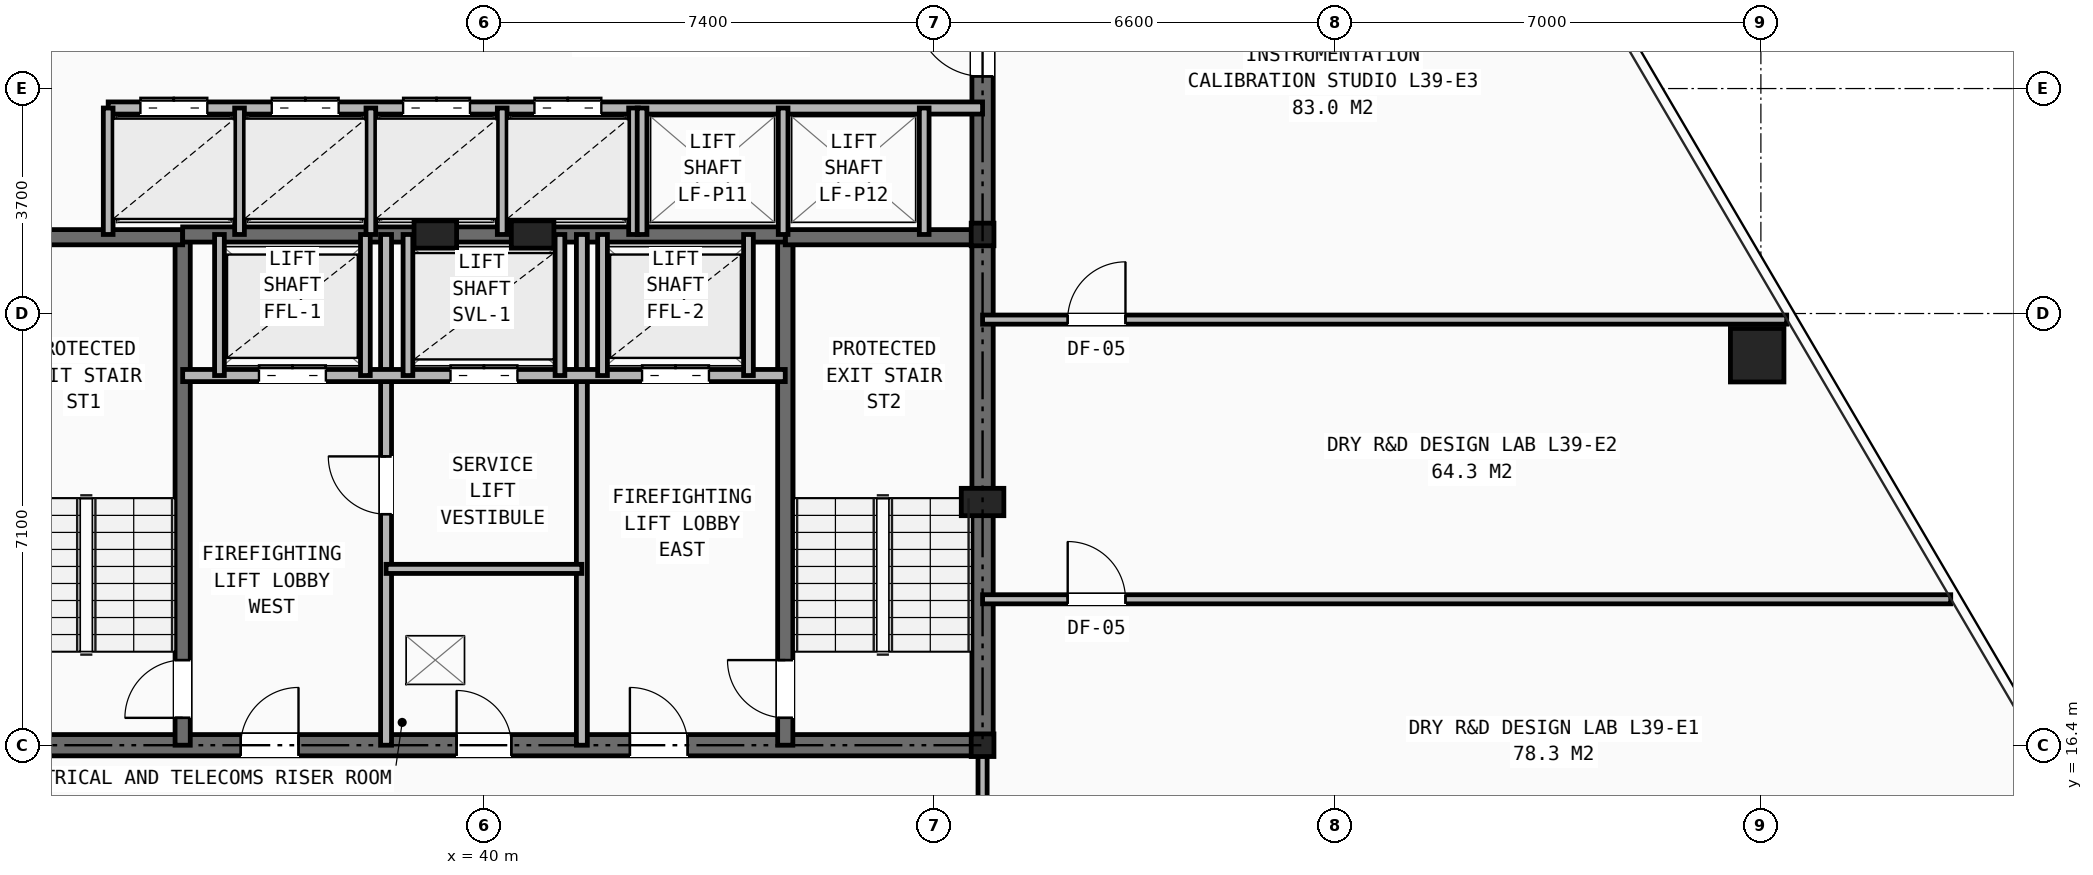
"""IFC4 building model, lengths in metres.
Left out: names, types, materials, properties, quantities, classifications, styles, units other than length and angle.
Written with IfcOpenShell. Run it as: python <this file> out.ifc"""

import sys

from ifc_helpers import new_model, si_unit, direction, frame, frame_2d, origin, origin_2d, place, context, subcontext, project, spatial, rectangle, hollow_rectangle, i_section, extrude, element, fill, save


model = new_model("IFC4")
c1 = context("Model", 3, precision=1e-05, world=origin(), true_north=direction((0.0, 1.0)))
c2 = subcontext(c1, "Body", "Model", "MODEL_VIEW")
j1 = project(units=[si_unit("LENGTHUNIT", "METRE"), si_unit("PLANEANGLEUNIT", "RADIAN")], contexts=[c1])
p1 = place(None, origin())
s1 = spatial("IfcSite", under=j1, at=p1, CompositionType="ELEMENT")
p2 = place(p1, origin())
s2 = spatial("IfcBuilding", under=s1, at=p2, CompositionType="ELEMENT")
p3 = place(p2, frame((0.0, 0.0, 136.7)))
s3 = spatial("IfcBuildingStorey", under=s2, at=p3, CompositionType="ELEMENT", Elevation=136.7)
for number, where, z_axis, x_axis in (
    (1, (48.2, 16.4, 0.0), (0.0, 0.0, 1.0), (1.0, 0.0, 0.0)),
    (2, (48.2, 24.8, 0.0), (0.0, 0.0, 1.0), (1.0, 0.0, 0.0)),
):
    element("IfcColumn", number, at=place(p3, frame(where, z_axis=z_axis, x_axis=x_axis)), inside=s3, PredefinedType="COLUMN", context=c2, shape_type="SweptSolid", body=[
        extrude(i_section(OverallWidth=0.374, OverallDepth=0.372, WebThickness=0.016, FlangeThickness=0.026, at=origin_2d()), origin(), (0.0, 0.0, 1.0), 3.45),
    ])
for number, where, z_axis, x_axis in (
    (3, (48.2, 20.4, 0.0), (0.0, 0.0, 1.0), (1.0, 0.0, 0.0)),
    (4, (39.2, 24.8, 0.0), (0.0, 0.0, 1.0), (1.0, 0.0, 0.0)),
    (5, (40.8, 24.8, 0.0), (0.0, 0.0, 1.0), (1.0, 0.0, 0.0)),
):
    element("IfcColumn", number, at=place(p3, frame(where, z_axis=z_axis, x_axis=x_axis)), inside=s3, PredefinedType="PILASTER", context=c2, shape_type="SweptSolid", body=[
        extrude(rectangle(XDim=0.7, YDim=0.45, at=origin_2d()), origin(), (0.0, 0.0, 1.0), 3.45),
    ])
p4 = place(p3, frame((60.939, 22.814, 0.0), z_axis=(0.0, 0.0, 1.0), x_axis=(1.0, 0.0, 0.0)))
e6 = element("IfcColumn", 6, at=p4, inside=s3, PredefinedType="COLUMN", context=c2, shape_type="SweptSolid", body=[
    extrude(hollow_rectangle(XDim=0.88, YDim=0.88, WallThickness=0.06, at=origin_2d()), origin(), (0.0, 0.0, 1.0), 3.45),
])
p5 = place(p3, frame((31.8, 16.4, 0.0), z_axis=(0.0, 0.0, 1.0), x_axis=(1.0, 0.0, 0.0)))
e7 = element("IfcWall", 7, at=p5, inside=s3, PredefinedType="SHEAR", context=c2, shape_type="SweptSolid", body=[
    extrude(rectangle(XDim=16.4, YDim=0.35, at=frame_2d((8.2, 0.0))), origin(), (0.0, 0.0, 1.0), 3.21),
])
p6 = place(p5, frame((7.75, 0.0, 0.0)))
e8 = element("IfcOpeningElement", 8, at=p6, cuts=e7, PredefinedType="OPENING", context=c2, shape_type="SweptSolid", body=[
    extrude(rectangle(XDim=0.9, YDim=2.1, at=frame_2d((0.45, 1.05))), frame((0.0, 0.185, 0.0), z_axis=(0.0, -1.0, 0.0), x_axis=(1.0, 0.0, 0.0)), (0.0, 0.0, 1.0), 0.37),
])
p7 = place(p5, frame((4.2, 0.0, 0.0)))
e9 = element("IfcOpeningElement", 9, at=p7, cuts=e7, PredefinedType="OPENING", context=c2, shape_type="SweptSolid", body=[
    extrude(rectangle(XDim=0.95, YDim=2.1, at=frame_2d((0.475, 1.05))), frame((0.0, 0.185, 0.0), z_axis=(0.0, -1.0, 0.0), x_axis=(1.0, 0.0, 0.0)), (0.0, 0.0, 1.0), 0.37),
])
p8 = place(p5, frame((10.6, 0.0, 0.0)))
e10 = element("IfcOpeningElement", 10, at=p8, cuts=e7, PredefinedType="OPENING", context=c2, shape_type="SweptSolid", body=[
    extrude(rectangle(XDim=0.95, YDim=2.1, at=frame_2d((0.475, 1.05))), frame((0.0, 0.185, 0.0), z_axis=(0.0, -1.0, 0.0), x_axis=(1.0, 0.0, 0.0)), (0.0, 0.0, 1.0), 0.37),
])
p9 = place(p3, frame((48.2, 16.4, 0.0), z_axis=(0.0, 0.0, 1.0), x_axis=(0.0, 1.0, 0.0)))
e11 = element("IfcWall", 11, at=p9, inside=s3, PredefinedType="SHEAR", context=c2, shape_type="SweptSolid", body=[
    extrude(rectangle(XDim=14.8, YDim=0.35, at=frame_2d((7.4, 0.0))), origin(), (0.0, 0.0, 1.0), 3.21),
])
p10 = place(p9, frame((11.0, 0.0, 0.0)))
e12 = element("IfcOpeningElement", 12, at=p10, cuts=e11, PredefinedType="OPENING", context=c2, shape_type="SweptSolid", body=[
    extrude(rectangle(XDim=1.1, YDim=2.15, at=frame_2d((0.55, 1.075))), frame((0.0, 0.185, 0.0), z_axis=(0.0, -1.0, 0.0), x_axis=(1.0, 0.0, 0.0)), (0.0, 0.0, 1.0), 0.37),
])
p11 = place(p3, frame((35.045, 16.4, 0.0), z_axis=(0.0, 0.0, 1.0), x_axis=(0.0, 1.0, 0.0)))
e13 = element("IfcWall", 13, at=p11, inside=s3, PredefinedType="SHEAR", context=c2, shape_type="SweptSolid", body=[
    extrude(rectangle(XDim=8.4, YDim=0.25, at=frame_2d((4.2, 0.0))), origin(), (0.0, 0.0, 1.0), 3.21),
])
p12 = place(p11, frame((0.45, 0.0, 0.0)))
e14 = element("IfcOpeningElement", 14, at=p12, cuts=e13, PredefinedType="OPENING", context=c2, shape_type="SweptSolid", body=[
    extrude(rectangle(XDim=0.95, YDim=2.1, at=frame_2d((0.475, 1.05))), frame((0.0, 0.135, 0.0), z_axis=(0.0, -1.0, 0.0), x_axis=(1.0, 0.0, 0.0)), (0.0, 0.0, 1.0), 0.27),
])
p13 = place(p3, frame((31.8, 24.755, 0.0), z_axis=(0.0, 0.0, 1.0), x_axis=(1.0, 0.0, 0.0)))
e15 = element("IfcWall", 15, at=p13, inside=s3, PredefinedType="SHEAR", context=c2, shape_type="SweptSolid", body=[
    extrude(rectangle(XDim=3.245, YDim=0.25, at=frame_2d((1.623, 0.0))), origin(), (0.0, 0.0, 1.0), 3.21),
])
p14 = place(p3, frame((44.955, 16.4, 0.0), z_axis=(0.0, 0.0, 1.0), x_axis=(0.0, 1.0, 0.0)))
e16 = element("IfcWall", 16, at=p14, inside=s3, PredefinedType="SHEAR", context=c2, shape_type="SweptSolid", body=[
    extrude(rectangle(XDim=8.4, YDim=0.25, at=frame_2d((4.2, 0.0))), origin(), (0.0, 0.0, 1.0), 3.21),
])
p15 = place(p14, frame((0.45, 0.0, 0.0)))
e17 = element("IfcOpeningElement", 17, at=p15, cuts=e16, PredefinedType="OPENING", context=c2, shape_type="SweptSolid", body=[
    extrude(rectangle(XDim=0.95, YDim=2.1, at=frame_2d((0.475, 1.05))), frame((0.0, 0.135, 0.0), z_axis=(0.0, -1.0, 0.0), x_axis=(1.0, 0.0, 0.0)), (0.0, 0.0, 1.0), 0.27),
])
p16 = place(p3, frame((44.955, 24.755, 0.0), z_axis=(0.0, 0.0, 1.0), x_axis=(1.0, 0.0, 0.0)))
e18 = element("IfcWall", 18, at=p16, inside=s3, PredefinedType="SHEAR", context=c2, shape_type="SweptSolid", body=[
    extrude(rectangle(XDim=3.245, YDim=0.25, at=frame_2d((1.623, 0.0))), origin(), (0.0, 0.0, 1.0), 3.21),
])
p17 = place(p3, frame((35.045, 24.8, 0.0), z_axis=(0.0, 0.0, 1.0), x_axis=(1.0, 0.0, 0.0)))
e19 = element("IfcWall", 19, at=p17, inside=s3, PredefinedType="SHEAR", context=c2, shape_type="SweptSolid", body=[
    extrude(rectangle(XDim=9.91, YDim=0.25, at=frame_2d((4.955, 0.0))), origin(), (0.0, 0.0, 1.0), 3.21),
])
p18 = place(p3, frame((38.39, 16.4, 0.0), z_axis=(0.0, 0.0, 1.0), x_axis=(0.0, 1.0, 0.0)))
e20 = element("IfcWall", 20, at=p18, inside=s3, PredefinedType="PARTITIONING", context=c2, shape_type="SweptSolid", body=[
    extrude(rectangle(XDim=8.4, YDim=0.18, at=frame_2d((4.2, 0.0))), origin(), (0.0, 0.0, 1.0), 2.661),
])
p19 = place(p18, frame((3.8, 0.0, 0.0)))
e21 = element("IfcOpeningElement", 21, at=p19, cuts=e20, PredefinedType="OPENING", context=c2, shape_type="SweptSolid", body=[
    extrude(rectangle(XDim=0.95, YDim=2.1, at=frame_2d((0.475, 1.05))), frame((0.0, 0.1, 0.0), z_axis=(0.0, -1.0, 0.0), x_axis=(1.0, 0.0, 0.0)), (0.0, 0.0, 1.0), 0.2),
])
p20 = place(p3, frame((41.61, 16.4, 0.0), z_axis=(0.0, 0.0, 1.0), x_axis=(0.0, 1.0, 0.0)))
e22 = element("IfcWall", 22, at=p20, inside=s3, PredefinedType="PARTITIONING", context=c2, shape_type="SweptSolid", body=[
    extrude(rectangle(XDim=8.4, YDim=0.18, at=frame_2d((4.2, 0.0))), origin(), (0.0, 0.0, 1.0), 2.661),
])
p21 = place(p3, frame((35.045, 22.48, 0.0), z_axis=(0.0, 0.0, 1.0), x_axis=(1.0, 0.0, 0.0)))
e23 = element("IfcWall", 23, at=p21, inside=s3, PredefinedType="SOLIDWALL", context=c2, shape_type="SweptSolid", body=[
    extrude(rectangle(XDim=9.91, YDim=0.2, at=frame_2d((4.955, 0.0))), origin(), (0.0, 0.0, 1.0), 3.21),
])
p22 = place(p21, frame((1.255, 0.0, 0.0)))
e24 = element("IfcOpeningElement", 24, at=p22, cuts=e23, PredefinedType="OPENING", context=c2, shape_type="SweptSolid", body=[
    extrude(rectangle(XDim=1.1, YDim=2.15, at=frame_2d((0.55, 1.075))), frame((0.0, 0.11, 0.0), z_axis=(0.0, -1.0, 0.0), x_axis=(1.0, 0.0, 0.0)), (0.0, 0.0, 1.0), 0.22),
])
p23 = place(p21, frame((7.555, 0.0, 0.0)))
e25 = element("IfcOpeningElement", 25, at=p23, cuts=e23, PredefinedType="OPENING", context=c2, shape_type="SweptSolid", body=[
    extrude(rectangle(XDim=1.1, YDim=2.15, at=frame_2d((0.55, 1.075))), frame((0.0, 0.11, 0.0), z_axis=(0.0, -1.0, 0.0), x_axis=(1.0, 0.0, 0.0)), (0.0, 0.0, 1.0), 0.22),
])
p24 = place(p21, frame((4.405, 0.0, 0.0)))
e26 = element("IfcOpeningElement", 26, at=p24, cuts=e23, PredefinedType="OPENING", context=c2, shape_type="SweptSolid", body=[
    extrude(rectangle(XDim=1.1, YDim=2.15, at=frame_2d((0.55, 1.075))), frame((0.0, 0.11, 0.0), z_axis=(0.0, -1.0, 0.0), x_axis=(1.0, 0.0, 0.0)), (0.0, 0.0, 1.0), 0.22),
])
p25 = place(p3, frame((38.39, 19.3, 0.0), z_axis=(0.0, 0.0, 1.0), x_axis=(1.0, 0.0, 0.0)))
e27 = element("IfcWall", 27, at=p25, inside=s3, PredefinedType="PARTITIONING", context=c2, shape_type="SweptSolid", body=[
    extrude(rectangle(XDim=3.22, YDim=0.15, at=frame_2d((1.61, 0.0))), origin(), (0.0, 0.0, 1.0), 3.21),
])
for number, where, z_axis, x_axis in (
    (28, (35.65, 22.48, 0.0), (0.0, 0.0, 1.0), (0.0, 1.0, 0.0)),
    (29, (38.05, 22.48, 0.0), (0.0, 0.0, 1.0), (0.0, 1.0, 0.0)),
    (30, (41.95, 22.48, 0.0), (0.0, 0.0, 1.0), (0.0, 1.0, 0.0)),
    (31, (44.35, 22.48, 0.0), (0.0, 0.0, 1.0), (0.0, 1.0, 0.0)),
    (32, (38.75, 22.48, 0.0), (0.0, 0.0, 1.0), (0.0, 1.0, 0.0)),
    (33, (41.25, 22.48, 0.0), (0.0, 0.0, 1.0), (0.0, 1.0, 0.0)),
):
    element("IfcWall", number, at=place(p3, frame(where, z_axis=z_axis, x_axis=x_axis)), inside=s3, PredefinedType="SOLIDWALL", context=c2, shape_type="SweptSolid", body=[
        extrude(rectangle(XDim=2.32, YDim=0.16, at=frame_2d((1.16, 0.0))), origin(), (0.0, 0.0, 1.0), 3.21),
    ])
p26 = place(p3, frame((33.82, 26.88, 0.0), z_axis=(0.0, 0.0, 1.0), x_axis=(1.0, 0.0, 0.0)))
e34 = element("IfcWall", 34, at=p26, inside=s3, PredefinedType="SOLIDWALL", context=c2, shape_type="SweptSolid", body=[
    extrude(rectangle(XDim=14.38, YDim=0.2, at=frame_2d((7.19, 0.0))), origin(), (0.0, 0.0, 1.0), 2.661),
])
p27 = place(p26, frame((0.53, 0.0, 0.0)))
e35 = element("IfcOpeningElement", 35, at=p27, cuts=e34, PredefinedType="OPENING", context=c2, shape_type="SweptSolid", body=[
    extrude(rectangle(XDim=1.1, YDim=2.15, at=frame_2d((0.55, 1.075))), frame((0.0, 0.11, 0.0), z_axis=(0.0, -1.0, 0.0), x_axis=(1.0, 0.0, 0.0)), (0.0, 0.0, 1.0), 0.22),
])
p28 = place(p26, frame((2.69, 0.0, 0.0)))
e36 = element("IfcOpeningElement", 36, at=p28, cuts=e34, PredefinedType="OPENING", context=c2, shape_type="SweptSolid", body=[
    extrude(rectangle(XDim=1.1, YDim=2.15, at=frame_2d((0.55, 1.075))), frame((0.0, 0.11, 0.0), z_axis=(0.0, -1.0, 0.0), x_axis=(1.0, 0.0, 0.0)), (0.0, 0.0, 1.0), 0.22),
])
p29 = place(p26, frame((4.85, 0.0, 0.0)))
e37 = element("IfcOpeningElement", 37, at=p29, cuts=e34, PredefinedType="OPENING", context=c2, shape_type="SweptSolid", body=[
    extrude(rectangle(XDim=1.1, YDim=2.15, at=frame_2d((0.55, 1.075))), frame((0.0, 0.11, 0.0), z_axis=(0.0, -1.0, 0.0), x_axis=(1.0, 0.0, 0.0)), (0.0, 0.0, 1.0), 0.22),
])
p30 = place(p26, frame((7.01, 0.0, 0.0)))
e38 = element("IfcOpeningElement", 38, at=p30, cuts=e34, PredefinedType="OPENING", context=c2, shape_type="SweptSolid", body=[
    extrude(rectangle(XDim=1.1, YDim=2.15, at=frame_2d((0.55, 1.075))), frame((0.0, 0.11, 0.0), z_axis=(0.0, -1.0, 0.0), x_axis=(1.0, 0.0, 0.0)), (0.0, 0.0, 1.0), 0.22),
])
for number, where, z_axis, x_axis in (
    (39, (33.82, 24.8, 0.0), (0.0, 0.0, 1.0), (0.0, 1.0, 0.0)),
    (40, (35.98, 24.8, 0.0), (0.0, 0.0, 1.0), (0.0, 1.0, 0.0)),
    (41, (38.14, 24.8, 0.0), (0.0, 0.0, 1.0), (0.0, 1.0, 0.0)),
    (42, (40.3, 24.8, 0.0), (0.0, 0.0, 1.0), (0.0, 1.0, 0.0)),
    (43, (42.46, 24.8, 0.0), (0.0, 0.0, 1.0), (0.0, 1.0, 0.0)),
    (44, (42.6, 24.8, 0.0), (0.0, 0.0, 1.0), (0.0, 1.0, 0.0)),
    (45, (44.92, 24.8, 0.0), (0.0, 0.0, 1.0), (0.0, 1.0, 0.0)),
    (46, (47.24, 24.8, 0.0), (0.0, 0.0, 1.0), (0.0, 1.0, 0.0)),
):
    element("IfcWall", number, at=place(p3, frame(where, z_axis=z_axis, x_axis=x_axis)), inside=s3, PredefinedType="SOLIDWALL", context=c2, shape_type="SweptSolid", body=[
        extrude(rectangle(XDim=2.08, YDim=0.16, at=frame_2d((1.04, 0.0))), origin(), (0.0, 0.0, 1.0), 3.21),
    ])
p31 = place(p3, frame((48.2, 14.1, 0.0), z_axis=(0.0, 0.0, 1.0), x_axis=(0.0, 1.0, 0.0)))
e47 = element("IfcWall", 47, at=p31, inside=s3, PredefinedType="PARTITIONING", context=c2, shape_type="SweptSolid", body=[
    extrude(rectangle(XDim=2.3, YDim=0.15, at=frame_2d((1.15, 0.0))), origin(), (0.0, 0.0, 1.0), 2.661),
])
p32 = place(p3, frame((48.2, 18.8, 0.0), z_axis=(0.0, 0.0, 1.0), x_axis=(1.0, 0.0, 0.0)))
e48 = element("IfcWall", 48, at=p32, inside=s3, PredefinedType="PARTITIONING", context=c2, shape_type="SweptSolid", body=[
    extrude(rectangle(XDim=15.922, YDim=0.15, at=frame_2d((7.961, 0.0))), origin(), (0.0, 0.0, 1.0), 2.589),
])
p33 = place(p32, frame((1.4, 0.0, 0.0)))
e49 = element("IfcOpeningElement", 49, at=p33, cuts=e48, PredefinedType="OPENING", context=c2, shape_type="SweptSolid", body=[
    extrude(rectangle(XDim=0.95, YDim=2.1, at=frame_2d((0.475, 1.05))), frame((0.0, 0.085, 0.0), z_axis=(0.0, -1.0, 0.0), x_axis=(1.0, 0.0, 0.0)), (0.0, 0.0, 1.0), 0.17),
])
p34 = place(p3, frame((48.2, 23.4, 0.0), z_axis=(0.0, 0.0, 1.0), x_axis=(1.0, 0.0, 0.0)))
e50 = element("IfcWall", 50, at=p34, inside=s3, PredefinedType="PARTITIONING", context=c2, shape_type="SweptSolid", body=[
    extrude(rectangle(XDim=13.225, YDim=0.15, at=frame_2d((6.612, 0.0))), origin(), (0.0, 0.0, 1.0), 2.589),
])
p35 = place(p34, frame((1.4, 0.0, 0.0)))
e51 = element("IfcOpeningElement", 51, at=p35, cuts=e50, PredefinedType="OPENING", context=c2, shape_type="SweptSolid", body=[
    extrude(rectangle(XDim=0.95, YDim=2.1, at=frame_2d((0.475, 1.05))), frame((0.0, 0.085, 0.0), z_axis=(0.0, -1.0, 0.0), x_axis=(1.0, 0.0, 0.0)), (0.0, 0.0, 1.0), 0.17),
])
p36 = place(p6, origin())
e52 = element("IfcDoor", 52, at=p36, inside=s3, OperationType="SINGLE_SWING_LEFT", PredefinedType="DOOR", context=c2, shape_type="SweptSolid", body=[
    extrude(rectangle(XDim=0.9, YDim=2.1, at=frame_2d((0.45, 1.05))), frame((0.0, 0.025, 0.0), z_axis=(0.0, -1.0, 0.0), x_axis=(1.0, 0.0, 0.0)), (0.0, 0.0, 1.0), 0.05),
])
fill(e8, e52)
p37 = place(p19, origin())
e53 = element("IfcDoor", 53, at=p37, inside=s3, OperationType="SINGLE_SWING_RIGHT", PredefinedType="DOOR", context=c2, shape_type="SweptSolid", body=[
    extrude(rectangle(XDim=0.95, YDim=2.1, at=frame_2d((0.475, 1.05))), frame((0.0, 0.025, 0.0), z_axis=(0.0, -1.0, 0.0), x_axis=(1.0, 0.0, 0.0)), (0.0, 0.0, 1.0), 0.05),
])
fill(e21, e53)
p38 = place(p12, origin())
e54 = element("IfcDoor", 54, at=p38, inside=s3, OperationType="SINGLE_SWING_LEFT", PredefinedType="DOOR", context=c2, shape_type="SweptSolid", body=[
    extrude(rectangle(XDim=0.95, YDim=2.1, at=frame_2d((0.475, 1.05))), frame((0.0, 0.025, 0.0), z_axis=(0.0, -1.0, 0.0), x_axis=(1.0, 0.0, 0.0)), (0.0, 0.0, 1.0), 0.05),
])
fill(e14, e54)
p39 = place(p15, origin())
e55 = element("IfcDoor", 55, at=p39, inside=s3, OperationType="SINGLE_SWING_RIGHT", PredefinedType="DOOR", context=c2, shape_type="SweptSolid", body=[
    extrude(rectangle(XDim=0.95, YDim=2.1, at=frame_2d((0.475, 1.05))), frame((0.0, 0.025, 0.0), z_axis=(0.0, -1.0, 0.0), x_axis=(1.0, 0.0, 0.0)), (0.0, 0.0, 1.0), 0.05),
])
fill(e17, e55)
p40 = place(p7, origin())
e56 = element("IfcDoor", 56, at=p40, inside=s3, OperationType="SINGLE_SWING_RIGHT", PredefinedType="DOOR", context=c2, shape_type="SweptSolid", body=[
    extrude(rectangle(XDim=0.95, YDim=2.1, at=frame_2d((0.475, 1.05))), frame((0.0, 0.025, 0.0), z_axis=(0.0, -1.0, 0.0), x_axis=(1.0, 0.0, 0.0)), (0.0, 0.0, 1.0), 0.05),
])
fill(e9, e56)
p41 = place(p8, origin())
e57 = element("IfcDoor", 57, at=p41, inside=s3, OperationType="SINGLE_SWING_LEFT", PredefinedType="DOOR", context=c2, shape_type="SweptSolid", body=[
    extrude(rectangle(XDim=0.95, YDim=2.1, at=frame_2d((0.475, 1.05))), frame((0.0, 0.025, 0.0), z_axis=(0.0, -1.0, 0.0), x_axis=(1.0, 0.0, 0.0)), (0.0, 0.0, 1.0), 0.05),
])
fill(e10, e57)
p42 = place(p22, origin())
e58 = element("IfcDoor", 58, at=p42, inside=s3, OperationType="DOUBLE_DOOR_SLIDING", PredefinedType="DOOR", context=c2, shape_type="SweptSolid", body=[
    extrude(rectangle(XDim=1.1, YDim=2.15, at=frame_2d((0.55, 1.075))), frame((0.0, 0.025, 0.0), z_axis=(0.0, -1.0, 0.0), x_axis=(1.0, 0.0, 0.0)), (0.0, 0.0, 1.0), 0.05),
])
fill(e24, e58)
p43 = place(p23, origin())
e59 = element("IfcDoor", 59, at=p43, inside=s3, OperationType="DOUBLE_DOOR_SLIDING", PredefinedType="DOOR", context=c2, shape_type="SweptSolid", body=[
    extrude(rectangle(XDim=1.1, YDim=2.15, at=frame_2d((0.55, 1.075))), frame((0.0, 0.025, 0.0), z_axis=(0.0, -1.0, 0.0), x_axis=(1.0, 0.0, 0.0)), (0.0, 0.0, 1.0), 0.05),
])
fill(e25, e59)
p44 = place(p24, origin())
e60 = element("IfcDoor", 60, at=p44, inside=s3, OperationType="DOUBLE_DOOR_SLIDING", PredefinedType="DOOR", context=c2, shape_type="SweptSolid", body=[
    extrude(rectangle(XDim=1.1, YDim=2.15, at=frame_2d((0.55, 1.075))), frame((0.0, 0.025, 0.0), z_axis=(0.0, -1.0, 0.0), x_axis=(1.0, 0.0, 0.0)), (0.0, 0.0, 1.0), 0.05),
])
fill(e26, e60)
p45 = place(p10, origin())
e61 = element("IfcDoor", 61, at=p45, inside=s3, OperationType="SINGLE_SWING_RIGHT", PredefinedType="DOOR", context=c2, shape_type="SweptSolid", body=[
    extrude(rectangle(XDim=1.1, YDim=2.15, at=frame_2d((0.55, 1.075))), frame((0.0, 0.025, 0.0), z_axis=(0.0, -1.0, 0.0), x_axis=(1.0, 0.0, 0.0)), (0.0, 0.0, 1.0), 0.05),
])
fill(e12, e61)
p46 = place(p27, origin())
e62 = element("IfcDoor", 62, at=p46, inside=s3, OperationType="DOUBLE_DOOR_SLIDING", PredefinedType="DOOR", context=c2, shape_type="SweptSolid", body=[
    extrude(rectangle(XDim=1.1, YDim=2.15, at=frame_2d((0.55, 1.075))), frame((0.0, 0.025, 0.0), z_axis=(0.0, -1.0, 0.0), x_axis=(1.0, 0.0, 0.0)), (0.0, 0.0, 1.0), 0.05),
])
fill(e35, e62)
p47 = place(p28, origin())
e63 = element("IfcDoor", 63, at=p47, inside=s3, OperationType="DOUBLE_DOOR_SLIDING", PredefinedType="DOOR", context=c2, shape_type="SweptSolid", body=[
    extrude(rectangle(XDim=1.1, YDim=2.15, at=frame_2d((0.55, 1.075))), frame((0.0, 0.025, 0.0), z_axis=(0.0, -1.0, 0.0), x_axis=(1.0, 0.0, 0.0)), (0.0, 0.0, 1.0), 0.05),
])
fill(e36, e63)
p48 = place(p29, origin())
e64 = element("IfcDoor", 64, at=p48, inside=s3, OperationType="DOUBLE_DOOR_SLIDING", PredefinedType="DOOR", context=c2, shape_type="SweptSolid", body=[
    extrude(rectangle(XDim=1.1, YDim=2.15, at=frame_2d((0.55, 1.075))), frame((0.0, 0.025, 0.0), z_axis=(0.0, -1.0, 0.0), x_axis=(1.0, 0.0, 0.0)), (0.0, 0.0, 1.0), 0.05),
])
fill(e37, e64)
p49 = place(p30, origin())
e65 = element("IfcDoor", 65, at=p49, inside=s3, OperationType="DOUBLE_DOOR_SLIDING", PredefinedType="DOOR", context=c2, shape_type="SweptSolid", body=[
    extrude(rectangle(XDim=1.1, YDim=2.15, at=frame_2d((0.55, 1.075))), frame((0.0, 0.025, 0.0), z_axis=(0.0, -1.0, 0.0), x_axis=(1.0, 0.0, 0.0)), (0.0, 0.0, 1.0), 0.05),
])
fill(e38, e65)
p50 = place(p33, origin())
e66 = element("IfcDoor", 66, at=p50, inside=s3, OperationType="SINGLE_SWING_LEFT", PredefinedType="DOOR", context=c2, shape_type="SweptSolid", body=[
    extrude(rectangle(XDim=0.95, YDim=2.1, at=frame_2d((0.475, 1.05))), frame((0.0, 0.025, 0.0), z_axis=(0.0, -1.0, 0.0), x_axis=(1.0, 0.0, 0.0)), (0.0, 0.0, 1.0), 0.05),
])
fill(e49, e66)
p51 = place(p35, origin())
e67 = element("IfcDoor", 67, at=p51, inside=s3, OperationType="SINGLE_SWING_RIGHT", PredefinedType="DOOR", context=c2, shape_type="SweptSolid", body=[
    extrude(rectangle(XDim=0.95, YDim=2.1, at=frame_2d((0.475, 1.05))), frame((0.0, 0.025, 0.0), z_axis=(0.0, -1.0, 0.0), x_axis=(1.0, 0.0, 0.0)), (0.0, 0.0, 1.0), 0.05),
])
fill(e51, e67)
save(model, sys.argv[1])
